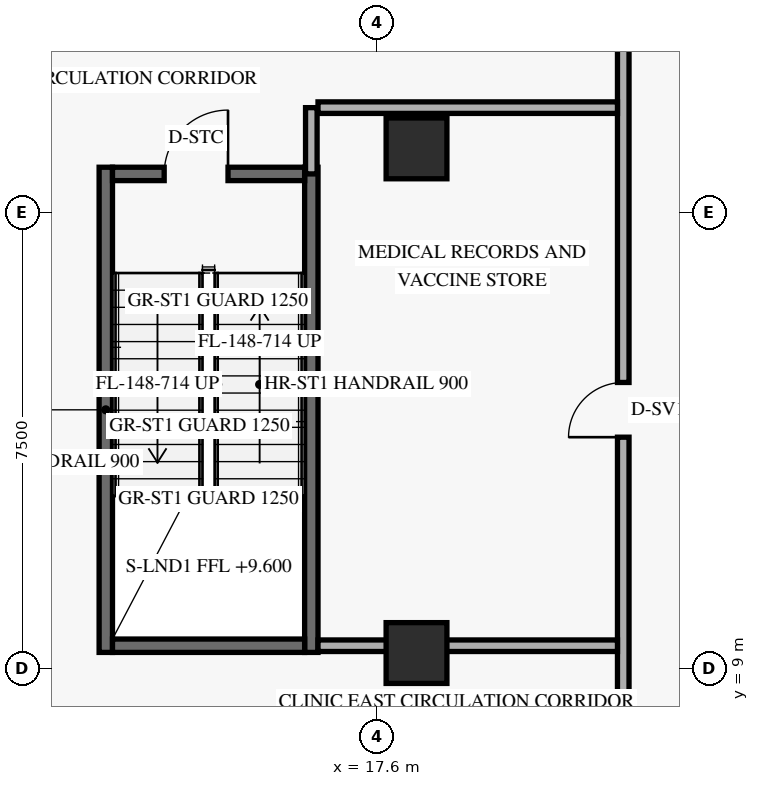
"""IFC4 building model, lengths in metres.
Left out: names, types, materials, properties, quantities, classifications, styles, units other than length and angle.
Written with IfcOpenShell. Run it as: python <this file> out.ifc"""

import sys

from ifc_helpers import new_model, si_unit, direction, frame, frame_2d, origin, origin_2d, place, context, subcontext, project, spatial, rectangle, extrude, element, fill, save


model = new_model("IFC4")
c1 = context("Model", 3, precision=1e-05, world=origin(), true_north=direction((0.0, 1.0)))
c2 = subcontext(c1, "Body", "Model", "MODEL_VIEW")
j1 = project(units=[si_unit("LENGTHUNIT", "METRE"), si_unit("PLANEANGLEUNIT", "RADIAN")], contexts=[c1])
p1 = place(None, origin())
s1 = spatial("IfcSite", under=j1, at=p1, CompositionType="ELEMENT")
p2 = place(p1, origin())
s2 = spatial("IfcBuilding", under=s1, at=p2, CompositionType="ELEMENT")
p3 = place(p2, frame((0.0, 0.0, 9.6)))
s3 = spatial("IfcBuildingStorey", under=s2, at=p3, CompositionType="ELEMENT", Elevation=9.6)
for number, where, z_axis, x_axis in (
    (1, (13.14, 9.26, 0.0), (0.0, 0.0, 1.0), (0.0, 1.0, 0.0)),
    (2, (16.52, 9.26, 0.0), (0.0, 0.0, 1.0), (0.0, 1.0, 0.0)),
):
    element("IfcWall", number, at=place(p3, frame(where, z_axis=z_axis, x_axis=x_axis)), inside=s3, PredefinedType="SHEAR", context=c2, shape_type="SweptSolid", body=[
        extrude(rectangle(XDim=7.98, YDim=0.22, at=frame_2d((3.99, 0.0))), origin(), (0.0, 0.0, 1.0), 4.52),
    ])
p4 = place(p3, frame((13.25, 9.37, 0.0), z_axis=(0.0, 0.0, 1.0), x_axis=(1.0, 0.0, 0.0)))
e3 = element("IfcWall", 3, at=p4, inside=s3, PredefinedType="SHEAR", context=c2, shape_type="SweptSolid", body=[
    extrude(rectangle(XDim=3.16, YDim=0.22, at=frame_2d((1.58, 0.0))), origin(), (0.0, 0.0, 1.0), 4.52),
])
p5 = place(p3, frame((13.25, 17.13, 0.0), z_axis=(0.0, 0.0, 1.0), x_axis=(1.0, 0.0, 0.0)))
e4 = element("IfcWall", 4, at=p5, inside=s3, PredefinedType="SHEAR", context=c2, shape_type="SweptSolid", body=[
    extrude(rectangle(XDim=3.16, YDim=0.22, at=frame_2d((1.58, 0.0))), origin(), (0.0, 0.0, 1.0), 4.52),
])
p6 = place(p5, frame((0.85, 0.0, 0.0)))
e5 = element("IfcOpeningElement", 5, at=p6, cuts=e4, PredefinedType="OPENING", context=c2, shape_type="SweptSolid", body=[
    extrude(rectangle(XDim=1.05, YDim=2.15, at=frame_2d((0.525, 1.075))), frame((0.0, 0.12, 0.0), z_axis=(0.0, -1.0, 0.0), x_axis=(1.0, 0.0, 0.0)), (0.0, 0.0, 1.0), 0.24),
])
for number, where, z_axis, x_axis in (
    (6, (18.25, 9.25, 0.0), (0.0, 0.0, 1.0), (1.0, 0.0, 0.0)),
    (7, (18.25, 17.55, 0.0), (0.0, 0.0, 1.0), (1.0, 0.0, 0.0)),
):
    element("IfcColumn", number, at=place(p3, frame(where, z_axis=z_axis, x_axis=x_axis)), inside=s3, PredefinedType="COLUMN", context=c2, shape_type="SweptSolid", body=[
        extrude(rectangle(XDim=1.0, YDim=1.0, at=origin_2d()), origin(), (0.0, 0.0, 1.0), 4.8),
    ])
p7 = place(p3, frame((21.65, 6.8, 0.0), z_axis=(0.0, 0.0, 1.0), x_axis=(0.0, 1.0, 0.0)))
e8 = element("IfcWall", 8, at=p7, inside=s3, PredefinedType="STANDARD", context=c2, shape_type="SweptSolid", body=[
    extrude(rectangle(XDim=34.4, YDim=0.19, at=frame_2d((17.2, 0.0))), origin(), (0.0, 0.0, 1.0), 3.575),
])
p8 = place(p7, frame((20.96, 0.0, 0.0)))
e9 = element("IfcOpeningElement", 9, at=p8, cuts=e8, PredefinedType="OPENING", context=c2, shape_type="SweptSolid", body=[
    extrude(rectangle(XDim=0.92, YDim=2.14, at=frame_2d((0.46, 1.07))), frame((0.0, 0.105, 0.0), z_axis=(0.0, -1.0, 0.0), x_axis=(1.0, 0.0, 0.0)), (0.0, 0.0, 1.0), 0.21),
])
p9 = place(p7, frame((28.2, 0.0, 0.0)))
e10 = element("IfcOpeningElement", 10, at=p9, cuts=e8, PredefinedType="OPENING", context=c2, shape_type="SweptSolid", body=[
    extrude(rectangle(XDim=0.95, YDim=2.15, at=frame_2d((0.475, 1.075))), frame((0.0, 0.105, 0.0), z_axis=(0.0, -1.0, 0.0), x_axis=(1.0, 0.0, 0.0)), (0.0, 0.0, 1.0), 0.21),
])
p10 = place(p7, frame((6.0, 0.0, 0.0)))
e11 = element("IfcOpeningElement", 11, at=p10, cuts=e8, PredefinedType="OPENING", context=c2, shape_type="SweptSolid", body=[
    extrude(rectangle(XDim=0.9, YDim=2.1, at=frame_2d((0.45, 1.05))), frame((0.0, 0.105, 0.0), z_axis=(0.0, -1.0, 0.0), x_axis=(1.0, 0.0, 0.0)), (0.0, 0.0, 1.0), 0.21),
])
p11 = place(p3, frame((16.63, 9.37, 0.0), z_axis=(0.0, 0.0, 1.0), x_axis=(1.0, 0.0, 0.0)))
e12 = element("IfcWall", 12, at=p11, inside=s3, PredefinedType="STANDARD", context=c2, shape_type="SweptSolid", body=[
    extrude(rectangle(XDim=4.925, YDim=0.19, at=frame_2d((2.462, 0.0))), origin(), (0.0, 0.0, 1.0), 3.575),
])
p12 = place(p3, frame((16.63, 18.22, 0.0), z_axis=(0.0, 0.0, 1.0), x_axis=(1.0, 0.0, 0.0)))
e13 = element("IfcWall", 13, at=p12, inside=s3, PredefinedType="STANDARD", context=c2, shape_type="SweptSolid", body=[
    extrude(rectangle(XDim=4.925, YDim=0.19, at=frame_2d((2.462, 0.0))), origin(), (0.0, 0.0, 1.0), 3.732),
])
p13 = place(p3, frame((16.52, 17.13, 0.0), z_axis=(0.0, 0.0, 1.0), x_axis=(0.0, 1.0, 0.0)))
e14 = element("IfcWall", 14, at=p13, inside=s3, PredefinedType="STANDARD", context=c2, shape_type="SweptSolid", body=[
    extrude(rectangle(XDim=1.09, YDim=0.19, at=frame_2d((0.545, 0.0))), origin(), (0.0, 0.0, 1.0), 3.575),
])
p14 = place(p6, frame((1.05, 0.0, 0.0), z_axis=(0.0, 0.0, 1.0), x_axis=(-1.0, 0.0, 0.0)))
e15 = element("IfcDoor", 15, at=p14, inside=s3, OperationType="SINGLE_SWING_LEFT", PredefinedType="DOOR", context=c2, shape_type="SweptSolid", body=[
    extrude(rectangle(XDim=1.05, YDim=2.15, at=frame_2d((0.525, 1.075))), frame((0.0, 0.025, 0.0), z_axis=(0.0, -1.0, 0.0), x_axis=(1.0, 0.0, 0.0)), (0.0, 0.0, 1.0), 0.05),
])
fill(e5, e15)
p15 = place(p10, origin())
e16 = element("IfcDoor", 16, at=p15, inside=s3, OperationType="SINGLE_SWING_LEFT", PredefinedType="DOOR", context=c2, shape_type="SweptSolid", body=[
    extrude(rectangle(XDim=0.9, YDim=2.1, at=frame_2d((0.45, 1.05))), frame((0.0, 0.025, 0.0), z_axis=(0.0, -1.0, 0.0), x_axis=(1.0, 0.0, 0.0)), (0.0, 0.0, 1.0), 0.05),
])
fill(e11, e16)
save(model, sys.argv[1])
